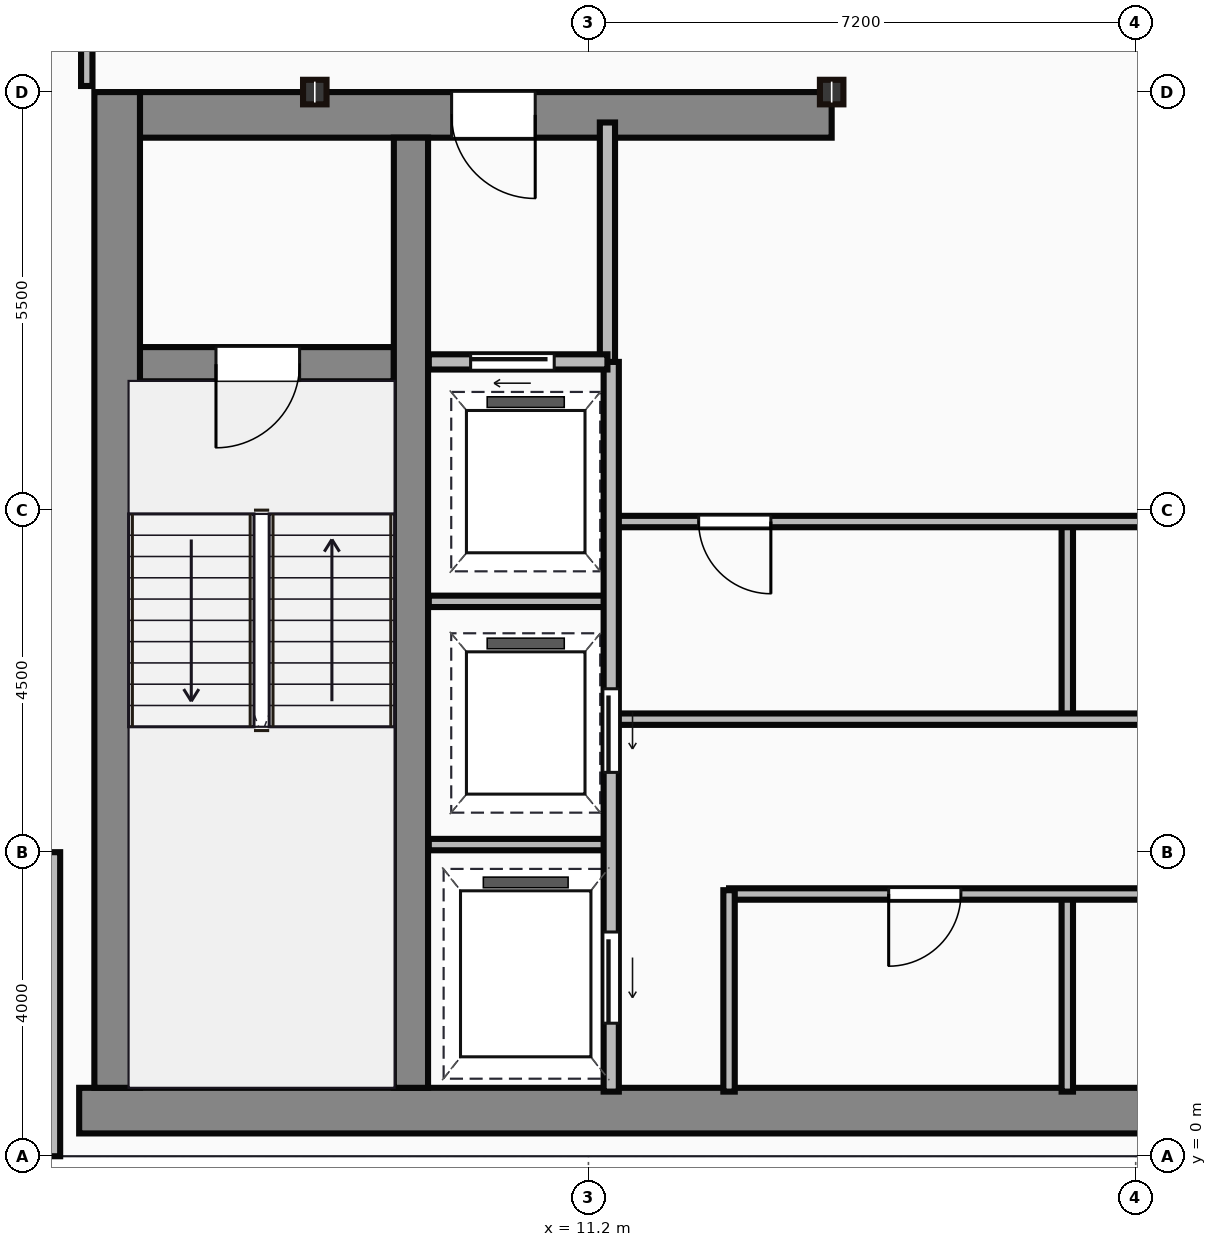
"""IFC4 building model, lengths in metres.
Left out: names, types, materials, properties, quantities, classifications, styles, units other than length and angle.
Written with IfcOpenShell. Run it as: python <this file> out.ifc"""

import sys

from ifc_helpers import new_model, si_unit, direction, frame, frame_2d, origin, origin_2d, place, context, subcontext, project, spatial, rectangle, i_section, extrude, source, transform, mapped, element, fill, save


model = new_model("IFC4")
c1 = context("Model", 3, precision=1e-05, world=origin(), true_north=direction((0.0, 1.0)))
c2 = subcontext(c1, "Body", "Model", "MODEL_VIEW")
j1 = project(units=[si_unit("LENGTHUNIT", "METRE"), si_unit("PLANEANGLEUNIT", "RADIAN")], contexts=[c1])
p1 = place(None, origin())
s1 = spatial("IfcSite", under=j1, at=p1, CompositionType="ELEMENT")
p2 = place(p1, origin())
s2 = spatial("IfcBuilding", under=s1, at=p2, CompositionType="ELEMENT")
p3 = place(p2, frame((0.0, 0.0, 217.8)))
s3 = spatial("IfcBuildingStorey", under=s2, at=p3, CompositionType="ELEMENT", Elevation=217.8)
m1 = source(origin(), c2, "Body", "SweptSolid", [
    extrude(rectangle(XDim=29.5, YDim=0.6, at=frame_2d((14.75, 0.0))), origin(), (0.0, 0.0, 1.0), 3.65),
])
p4 = place(p3, frame((4.5, 0.6, 0.0), z_axis=(0.0, 0.0, 1.0), x_axis=(1.0, 0.0, 0.0)))
e1 = element("IfcWall", 1, at=p4, inside=s3, PredefinedType="SHEAR", context=c2, shape_type="MappedRepresentation", body=[
    mapped(m1, transform((0.0, 0.0, 0.0))),
])
m2 = source(origin(), c2, "Body", "SweptSolid", [
    extrude(rectangle(XDim=13.1, YDim=0.6, at=frame_2d((6.55, 0.0))), origin(), (0.0, 0.0, 1.0), 3.65),
])
p5 = place(p3, frame((5.0, 0.9, 0.0), z_axis=(0.0, 0.0, 1.0), x_axis=(0.0, 1.0, 0.0)))
e2 = element("IfcWall", 2, at=p5, inside=s3, PredefinedType="SHEAR", context=c2, shape_type="MappedRepresentation", body=[
    mapped(m2, transform((0.0, 0.0, 0.0))),
])
m3 = source(origin(), c2, "Body", "SweptSolid", [
    extrude(rectangle(XDim=9.1, YDim=0.6, at=frame_2d((4.55, 0.0))), origin(), (0.0, 0.0, 1.0), 3.65),
])
p6 = place(p3, frame((5.3, 13.7, 0.0), z_axis=(0.0, 0.0, 1.0), x_axis=(1.0, 0.0, 0.0)))
e3 = element("IfcWall", 3, at=p6, inside=s3, PredefinedType="SHEAR", context=c2, shape_type="MappedRepresentation", body=[
    mapped(m3, transform((0.0, 0.0, 0.0))),
])
p7 = place(p6, frame((4.1, 0.0, 0.0)))
e4 = element("IfcOpeningElement", 4, at=p7, cuts=e3, PredefinedType="OPENING", context=c2, shape_type="SweptSolid", body=[
    extrude(rectangle(XDim=1.1, YDim=2.15, at=frame_2d((0.55, 1.075))), frame((0.0, 0.31, 0.0), z_axis=(0.0, -1.0, 0.0), x_axis=(1.0, 0.0, 0.0)), (0.0, 0.0, 1.0), 0.62),
])
m4 = source(origin(), c2, "Body", "SweptSolid", [
    extrude(rectangle(XDim=12.5, YDim=0.45, at=frame_2d((6.25, 0.0))), origin(), (0.0, 0.0, 1.0), 3.65),
])
p8 = place(p3, frame((8.865, 0.9, 0.0), z_axis=(0.0, 0.0, 1.0), x_axis=(0.0, 1.0, 0.0)))
e5 = element("IfcWall", 5, at=p8, inside=s3, PredefinedType="SHEAR", context=c2, shape_type="MappedRepresentation", body=[
    mapped(m4, transform((0.0, 0.0, 0.0))),
])
m5 = source(origin(), c2, "Body", "SweptSolid", [
    extrude(rectangle(XDim=3.39, YDim=0.45, at=frame_2d((1.695, 0.0))), origin(), (0.0, 0.0, 1.0), 3.65),
])
p9 = place(p3, frame((5.25, 10.42, 0.0), z_axis=(0.0, 0.0, 1.0), x_axis=(1.0, 0.0, 0.0)))
e6 = element("IfcWall", 6, at=p9, inside=s3, PredefinedType="SHEAR", context=c2, shape_type="MappedRepresentation", body=[
    mapped(m5, transform((0.0, 0.0, 0.0))),
])
p10 = place(p9, frame((1.05, 0.0, 0.0)))
e7 = element("IfcOpeningElement", 7, at=p10, cuts=e6, PredefinedType="OPENING", context=c2, shape_type="SweptSolid", body=[
    extrude(rectangle(XDim=1.1, YDim=2.15, at=frame_2d((0.55, 1.075))), frame((0.0, 0.235, 0.0), z_axis=(0.0, -1.0, 0.0), x_axis=(1.0, 0.0, 0.0)), (0.0, 0.0, 1.0), 0.47),
])
m6 = source(origin(), c2, "Body", "SweptSolid", [
    extrude(i_section(OverallWidth=0.309, OverallDepth=0.323, WebThickness=0.014, FlangeThickness=0.023, at=origin_2d()), origin(), (0.0, 0.0, 1.0), 3.65),
])
for number, where, z_axis, x_axis in (
    (8, (7.6, 14.0, 0.0), (0.0, 0.0, 1.0), (1.0, 0.0, 0.0)),
    (9, (14.4, 14.0, 0.0), (0.0, 0.0, 1.0), (1.0, 0.0, 0.0)),
):
    element("IfcColumn", number, at=place(p3, frame(where, z_axis=z_axis, x_axis=x_axis)), inside=s3, PredefinedType="COLUMN", context=c2, shape_type="MappedRepresentation", body=[
        mapped(m6, transform((0.0, 0.0, 0.0))),
    ])
m7 = source(origin(), c2, "Body", "SweptSolid", [
    extrude(rectangle(XDim=4.0, YDim=0.25, at=frame_2d((2.0, 0.0))), origin(), (0.0, 0.0, 1.0), 3.4),
])
p11 = place(p3, frame((4.125, 4.0, 0.0), z_axis=(0.0, 0.0, 1.0), x_axis=(0.0, -1.0, 0.0)))
e10 = element("IfcWall", 10, at=p11, inside=s3, PredefinedType="STANDARD", context=c2, shape_type="MappedRepresentation", body=[
    mapped(m7, transform((0.0, 0.0, 0.0))),
])
m8 = source(origin(), c2, "Body", "SweptSolid", [
    extrude(rectangle(XDim=3.18, YDim=0.2, at=frame_2d((1.59, 0.0))), origin(), (0.0, 0.0, 1.0), 3.4),
])
p12 = place(p3, frame((11.45, 10.42, 0.0), z_axis=(0.0, 0.0, 1.0), x_axis=(0.0, 1.0, 0.0)))
e11 = element("IfcWall", 11, at=p12, inside=s3, PredefinedType="PARTITIONING", context=c2, shape_type="MappedRepresentation", body=[
    mapped(m8, transform((0.0, 0.0, 0.0))),
])
m9 = source(origin(), c2, "Body", "SweptSolid", [
    extrude(rectangle(XDim=2.35, YDim=0.2, at=frame_2d((1.175, 0.0))), origin(), (0.0, 0.0, 1.0), 3.4),
])
p13 = place(p3, frame((9.1, 10.45, 0.0), z_axis=(0.0, 0.0, 1.0), x_axis=(1.0, 0.0, 0.0)))
e12 = element("IfcWall", 12, at=p13, inside=s3, PredefinedType="PARTITIONING", context=c2, shape_type="MappedRepresentation", body=[
    mapped(m9, transform((0.0, 0.0, 0.0))),
])
p14 = place(p13, frame((0.55, 0.0, 0.0)))
e13 = element("IfcOpeningElement", 13, at=p14, cuts=e12, PredefinedType="OPENING", context=c2, shape_type="SweptSolid", body=[
    extrude(rectangle(XDim=1.1, YDim=2.15, at=frame_2d((0.55, 1.075))), frame((0.0, 0.11, 0.0), z_axis=(0.0, -1.0, 0.0), x_axis=(1.0, 0.0, 0.0)), (0.0, 0.0, 1.0), 0.22),
])
m10 = source(origin(), c2, "Body", "SweptSolid", [
    extrude(rectangle(XDim=9.6, YDim=0.2, at=frame_2d((4.8, 0.0))), origin(), (0.0, 0.0, 1.0), 3.4),
])
p15 = place(p3, frame((11.5, 0.85, 0.0), z_axis=(0.0, 0.0, 1.0), x_axis=(0.0, 1.0, 0.0)))
e14 = element("IfcWall", 14, at=p15, inside=s3, PredefinedType="PARTITIONING", context=c2, shape_type="MappedRepresentation", body=[
    mapped(m10, transform((0.0, 0.0, 0.0))),
])
p16 = place(p15, frame((4.2, 0.0, 0.0)))
e15 = element("IfcOpeningElement", 15, at=p16, cuts=e14, PredefinedType="OPENING", context=c2, shape_type="SweptSolid", body=[
    extrude(rectangle(XDim=1.1, YDim=2.15, at=frame_2d((0.55, 1.075))), frame((0.0, 0.11, 0.0), z_axis=(0.0, -1.0, 0.0), x_axis=(1.0, 0.0, 0.0)), (0.0, 0.0, 1.0), 0.22),
])
p17 = place(p15, frame((0.9, 0.0, 0.0)))
e16 = element("IfcOpeningElement", 16, at=p17, cuts=e14, PredefinedType="OPENING", context=c2, shape_type="SweptSolid", body=[
    extrude(rectangle(XDim=1.2, YDim=2.15, at=frame_2d((0.6, 1.075))), frame((0.0, 0.11, 0.0), z_axis=(0.0, -1.0, 0.0), x_axis=(1.0, 0.0, 0.0)), (0.0, 0.0, 1.0), 0.22),
])
m11 = source(origin(), c2, "Body", "SweptSolid", [
    extrude(rectangle(XDim=2.4, YDim=0.15, at=frame_2d((1.2, 0.0))), origin(), (0.0, 0.0, 1.0), 3.4),
])
for number, where, z_axis, x_axis in (
    (17, (9.1, 4.1, 0.0), (0.0, 0.0, 1.0), (1.0, 0.0, 0.0)),
    (18, (9.1, 7.3, 0.0), (0.0, 0.0, 1.0), (1.0, 0.0, 0.0)),
):
    element("IfcWall", number, at=place(p3, frame(where, z_axis=z_axis, x_axis=x_axis)), inside=s3, PredefinedType="PARTITIONING", context=c2, shape_type="MappedRepresentation", body=[
        mapped(m11, transform((0.0, 0.0, 0.0))),
    ])
m12 = source(origin(), c2, "Body", "SweptSolid", [
    extrude(rectangle(XDim=2.65, YDim=0.15, at=frame_2d((1.325, 0.0))), origin(), (0.0, 0.0, 1.0), 3.4),
])
p18 = place(p3, frame((13.05, 0.85, 0.0), z_axis=(0.0, 0.0, 1.0), x_axis=(0.0, 1.0, 0.0)))
e19 = element("IfcWall", 19, at=p18, inside=s3, PredefinedType="PARTITIONING", context=c2, shape_type="MappedRepresentation", body=[
    mapped(m12, transform((0.0, 0.0, 0.0))),
])
m13 = source(origin(), c2, "Body", "SweptSolid", [
    extrude(rectangle(XDim=10.35, YDim=0.15, at=frame_2d((5.175, 0.0))), origin(), (0.0, 0.0, 1.0), 3.4),
])
p19 = place(p3, frame((13.05, 3.45, 0.0), z_axis=(0.0, 0.0, 1.0), x_axis=(1.0, 0.0, 0.0)))
e20 = element("IfcWall", 20, at=p19, inside=s3, PredefinedType="PARTITIONING", context=c2, shape_type="MappedRepresentation", body=[
    mapped(m13, transform((0.0, 0.0, 0.0))),
])
p20 = place(p19, frame((2.1, 0.0, 0.0)))
e21 = element("IfcOpeningElement", 21, at=p20, cuts=e20, PredefinedType="OPENING", context=c2, shape_type="SweptSolid", body=[
    extrude(rectangle(XDim=0.95, YDim=2.15, at=frame_2d((0.475, 1.075))), frame((0.0, 0.085, 0.0), z_axis=(0.0, -1.0, 0.0), x_axis=(1.0, 0.0, 0.0)), (0.0, 0.0, 1.0), 0.17),
])
p21 = place(p19, frame((6.8, 0.0, 0.0)))
e22 = element("IfcOpeningElement", 22, at=p21, cuts=e20, PredefinedType="OPENING", context=c2, shape_type="SweptSolid", body=[
    extrude(rectangle(XDim=0.95, YDim=2.15, at=frame_2d((0.475, 1.075))), frame((0.0, 0.085, 0.0), z_axis=(0.0, -1.0, 0.0), x_axis=(1.0, 0.0, 0.0)), (0.0, 0.0, 1.0), 0.17),
])
m14 = source(origin(), c2, "Body", "SweptSolid", [
    extrude(rectangle(XDim=2.6, YDim=0.15, at=frame_2d((1.3, 0.0))), origin(), (0.0, 0.0, 1.0), 3.4),
])
p22 = place(p3, frame((17.5, 0.85, 0.0), z_axis=(0.0, 0.0, 1.0), x_axis=(0.0, 1.0, 0.0)))
e23 = element("IfcWall", 23, at=p22, inside=s3, PredefinedType="PARTITIONING", context=c2, shape_type="MappedRepresentation", body=[
    mapped(m14, transform((0.0, 0.0, 0.0))),
])
m15 = source(origin(), c2, "Body", "SweptSolid", [
    extrude(rectangle(XDim=11.85, YDim=0.15, at=frame_2d((5.925, 0.0))), origin(), (0.0, 0.0, 1.0), 3.4),
])
p23 = place(p3, frame((11.55, 5.75, 0.0), z_axis=(0.0, 0.0, 1.0), x_axis=(1.0, 0.0, 0.0)))
e24 = element("IfcWall", 24, at=p23, inside=s3, PredefinedType="PARTITIONING", context=c2, shape_type="MappedRepresentation", body=[
    mapped(m15, transform((0.0, 0.0, 0.0))),
])
p24 = place(p3, frame((11.55, 8.35, 0.0), z_axis=(0.0, 0.0, 1.0), x_axis=(1.0, 0.0, 0.0)))
e25 = element("IfcWall", 25, at=p24, inside=s3, PredefinedType="PARTITIONING", context=c2, shape_type="MappedRepresentation", body=[
    mapped(m15, transform((0.0, 0.0, 0.0))),
])
p25 = place(p24, frame((1.1, 0.0, 0.0)))
e26 = element("IfcOpeningElement", 26, at=p25, cuts=e25, PredefinedType="OPENING", context=c2, shape_type="SweptSolid", body=[
    extrude(rectangle(XDim=0.95, YDim=2.15, at=frame_2d((0.475, 1.075))), frame((0.0, 0.085, 0.0), z_axis=(0.0, -1.0, 0.0), x_axis=(1.0, 0.0, 0.0)), (0.0, 0.0, 1.0), 0.17),
])
p26 = place(p24, frame((9.4, 0.0, 0.0)))
e27 = element("IfcOpeningElement", 27, at=p26, cuts=e25, PredefinedType="OPENING", context=c2, shape_type="SweptSolid", body=[
    extrude(rectangle(XDim=0.95, YDim=2.15, at=frame_2d((0.475, 1.075))), frame((0.0, 0.085, 0.0), z_axis=(0.0, -1.0, 0.0), x_axis=(1.0, 0.0, 0.0)), (0.0, 0.0, 1.0), 0.17),
])
m16 = source(origin(), c2, "Body", "SweptSolid", [
    extrude(rectangle(XDim=2.5, YDim=0.15, at=frame_2d((1.25, 0.0))), origin(), (0.0, 0.0, 1.0), 3.4),
])
p27 = place(p3, frame((17.5, 5.8, 0.0), z_axis=(0.0, 0.0, 1.0), x_axis=(0.0, 1.0, 0.0)))
e28 = element("IfcWall", 28, at=p27, inside=s3, PredefinedType="PARTITIONING", context=c2, shape_type="MappedRepresentation", body=[
    mapped(m16, transform((0.0, 0.0, 0.0))),
])
m17 = source(origin(), c2, "Body", "SweptSolid", [
    extrude(rectangle(XDim=2.12, YDim=0.15, at=frame_2d((1.06, 0.0))), origin(), (0.0, 0.0, 1.0), 3.4),
])
p28 = place(p3, frame((4.6, 14.08, 0.0), z_axis=(0.0, 0.0, 1.0), x_axis=(0.0, 1.0, 0.0)))
e29 = element("IfcWall", 29, at=p28, inside=s3, PredefinedType="PARTITIONING", context=c2, shape_type="MappedRepresentation", body=[
    mapped(m17, transform((0.0, 0.0, 0.0))),
])
m18 = source(origin(), c2, "Body", "SweptSolid", [
    extrude(rectangle(XDim=1.1, YDim=2.15, at=frame_2d((0.55, 1.075))), frame((0.0, 0.025, 0.0), z_axis=(0.0, -1.0, 0.0), x_axis=(1.0, 0.0, 0.0)), (0.0, 0.0, 1.0), 0.05),
])
p29 = place(p10, frame((1.1, 0.0, 0.0), z_axis=(0.0, 0.0, 1.0), x_axis=(-1.0, 0.0, 0.0)))
e30 = element("IfcDoor", 30, at=p29, inside=s3, OperationType="SINGLE_SWING_LEFT", PredefinedType="DOOR", context=c2, shape_type="MappedRepresentation", body=[
    mapped(m18, transform((0.0, 0.0, 0.0))),
])
fill(e7, e30)
p30 = place(p7, origin())
e31 = element("IfcDoor", 31, at=p30, inside=s3, OperationType="SINGLE_SWING_RIGHT", PredefinedType="DOOR", context=c2, shape_type="MappedRepresentation", body=[
    mapped(m18, transform((0.0, 0.0, 0.0))),
])
fill(e4, e31)
p31 = place(p14, origin())
e32 = element("IfcDoor", 32, at=p31, inside=s3, OperationType="SLIDING_TO_LEFT", PredefinedType="DOOR", context=c2, shape_type="MappedRepresentation", body=[
    mapped(m18, transform((0.0, 0.0, 0.0))),
])
fill(e13, e32)
p32 = place(p16, frame((1.1, 0.0, 0.0), z_axis=(0.0, 0.0, 1.0), x_axis=(-1.0, 0.0, 0.0)))
e33 = element("IfcDoor", 33, at=p32, inside=s3, OperationType="SLIDING_TO_LEFT", PredefinedType="DOOR", context=c2, shape_type="MappedRepresentation", body=[
    mapped(m18, transform((0.0, 0.0, 0.0))),
])
fill(e15, e33)
m19 = source(origin(), c2, "Body", "SweptSolid", [
    extrude(rectangle(XDim=1.2, YDim=2.15, at=frame_2d((0.6, 1.075))), frame((0.0, 0.025, 0.0), z_axis=(0.0, -1.0, 0.0), x_axis=(1.0, 0.0, 0.0)), (0.0, 0.0, 1.0), 0.05),
])
p33 = place(p17, frame((1.2, 0.0, 0.0), z_axis=(0.0, 0.0, 1.0), x_axis=(-1.0, 0.0, 0.0)))
e34 = element("IfcDoor", 34, at=p33, inside=s3, OperationType="SLIDING_TO_LEFT", PredefinedType="DOOR", context=c2, shape_type="MappedRepresentation", body=[
    mapped(m19, transform((0.0, 0.0, 0.0))),
])
fill(e16, e34)
m20 = source(origin(), c2, "Body", "SweptSolid", [
    extrude(rectangle(XDim=0.95, YDim=2.15, at=frame_2d((0.475, 1.075))), frame((0.0, 0.025, 0.0), z_axis=(0.0, -1.0, 0.0), x_axis=(1.0, 0.0, 0.0)), (0.0, 0.0, 1.0), 0.05),
])
p34 = place(p20, origin())
e35 = element("IfcDoor", 35, at=p34, inside=s3, OperationType="SINGLE_SWING_LEFT", PredefinedType="DOOR", context=c2, shape_type="MappedRepresentation", body=[
    mapped(m20, transform((0.0, 0.0, 0.0))),
])
fill(e21, e35)
p35 = place(p25, origin())
e36 = element("IfcDoor", 36, at=p35, inside=s3, OperationType="SINGLE_SWING_RIGHT", PredefinedType="DOOR", context=c2, shape_type="MappedRepresentation", body=[
    mapped(m20, transform((0.0, 0.0, 0.0))),
])
fill(e26, e36)
save(model, sys.argv[1])
